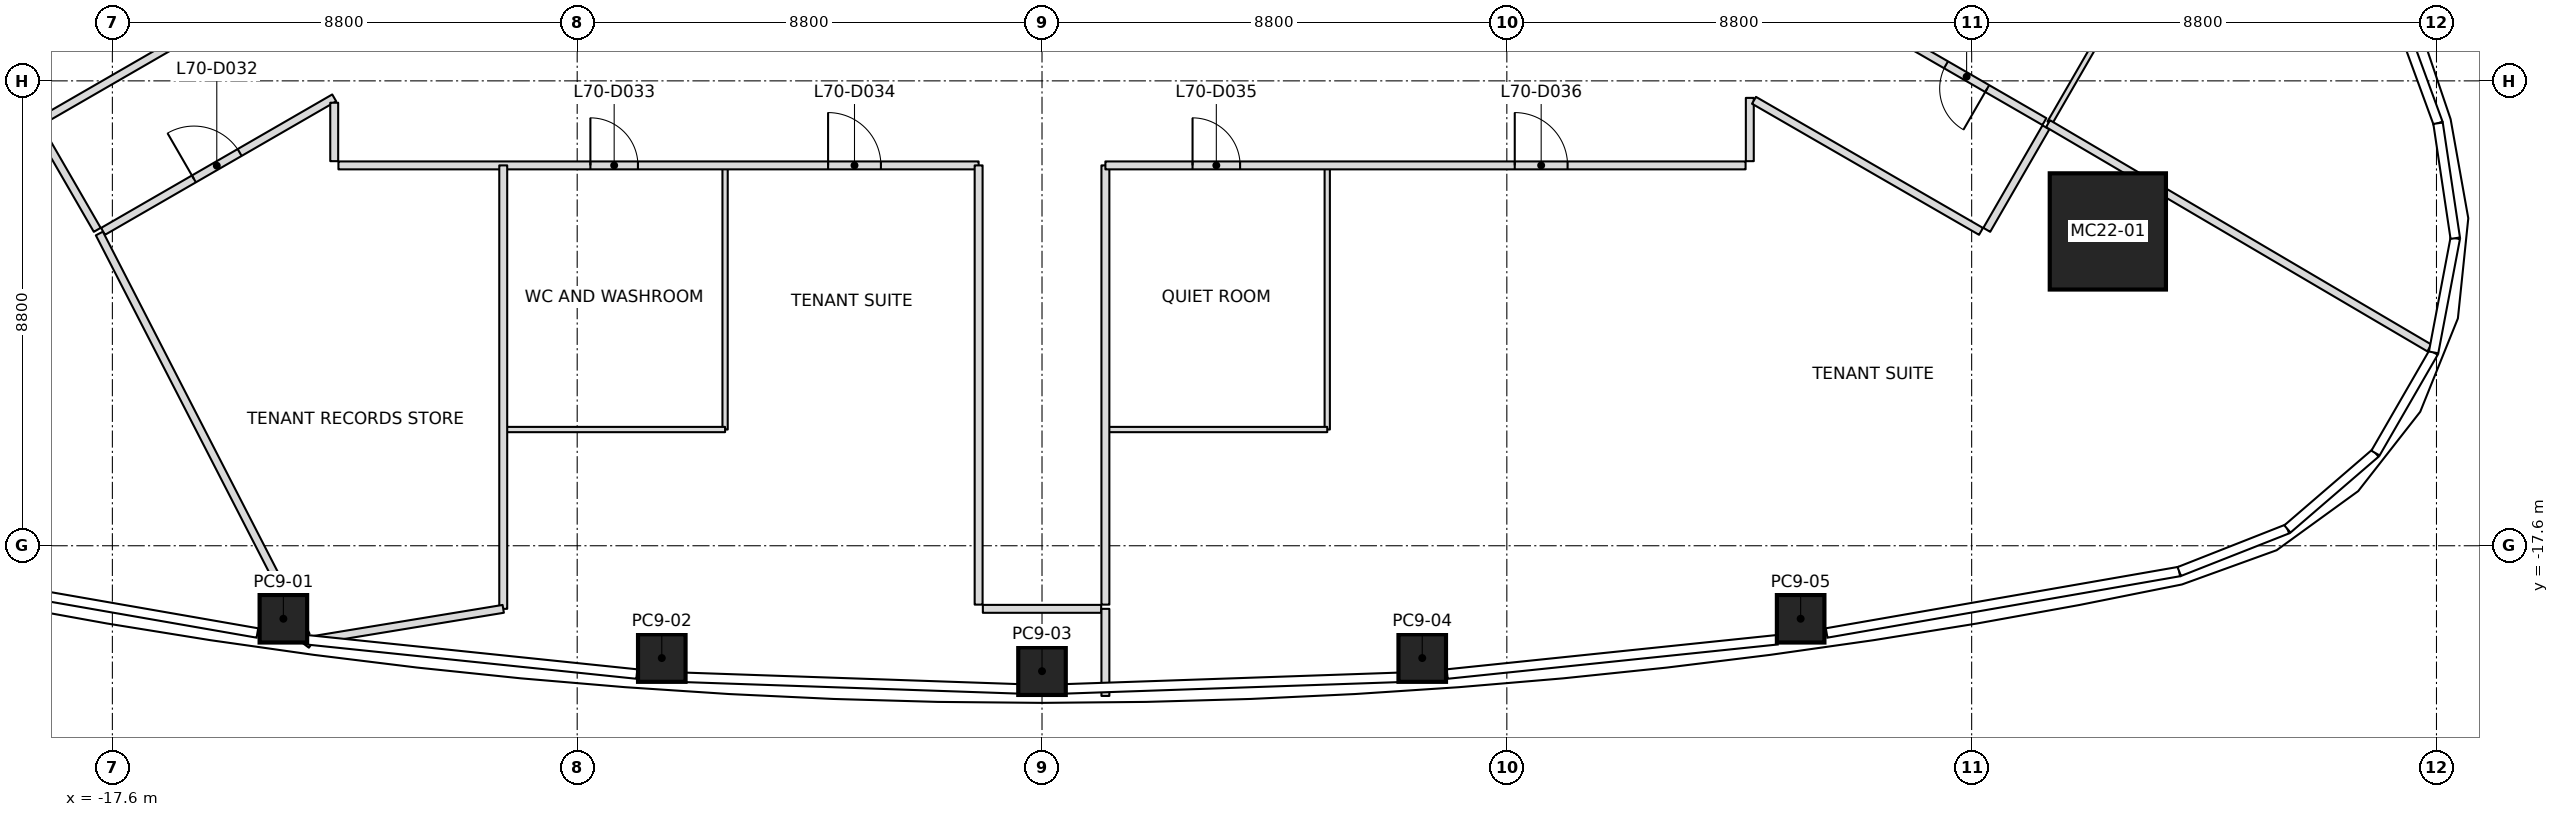
"""IFC4 building model, lengths in metres.
Left out: names, types, materials, properties, quantities, classifications, styles, units other than length and angle.
Written with IfcOpenShell. Run it as: python <this file> out.ifc"""

import sys

from ifc_helpers import new_model, si_unit, direction, frame, frame_2d, origin, origin_2d, place, context, subcontext, project, spatial, rectangle, extrude, element, fill, save


model = new_model("IFC4")
c1 = context("Model", 3, precision=1e-05, world=origin(), true_north=direction((0.0, 1.0)))
c2 = subcontext(c1, "Body", "Model", "MODEL_VIEW")
j1 = project(units=[si_unit("LENGTHUNIT", "METRE"), si_unit("PLANEANGLEUNIT", "RADIAN")], contexts=[c1])
p1 = place(None, origin())
s1 = spatial("IfcSite", under=j1, at=p1, CompositionType="ELEMENT")
p2 = place(p1, origin())
s2 = spatial("IfcBuilding", under=s1, at=p2, CompositionType="ELEMENT")
p3 = place(p2, frame((0.0, 0.0, 307.0)))
s3 = spatial("IfcBuildingStorey", under=s2, at=p3, CompositionType="ELEMENT", Elevation=307.0)
p4 = place(p3, frame((20.178, -11.65, 0.0), z_axis=(-0.027695790401, 0.015983033227, 0.999488612163), x_axis=(0.999616398022, 0.00044283261, 0.027692249912)))
e1 = element("IfcColumn", 1, at=p4, inside=s3, PredefinedType="COLUMN", context=c2, shape_type="SweptSolid", body=[
    extrude(rectangle(XDim=2.2, YDim=2.2, at=origin_2d()), origin(), (0.0, 0.0, 1.0), 4.002),
])
p5 = place(p3, frame((-14.363, -18.982, 0.0), z_axis=(0.017452456582, 0.010373837829, 0.999793876381), x_axis=(-0.990343726518, 0.137723680124, 0.015858476572)))
e2 = element("IfcColumn", 2, at=p5, inside=s3, PredefinedType="COLUMN", context=c2, shape_type="SweptSolid", body=[
    extrude(rectangle(XDim=0.9, YDim=0.9, at=origin_2d()), origin(), (0.0, 0.0, 1.0), 4.001),
])
p6 = place(p3, frame((-7.198, -19.726, 0.0), z_axis=(0.008727150594, 0.011168311599, 0.999899547784), x_axis=(-0.997582824169, 0.069032824425, 0.007935872619)))
e3 = element("IfcColumn", 3, at=p6, inside=s3, PredefinedType="COLUMN", context=c2, shape_type="SweptSolid", body=[
    extrude(rectangle(XDim=0.9, YDim=0.9, at=origin_2d()), origin(), (0.0, 0.0, 1.0), 4.0),
])
p7 = place(p3, frame((0.0, -19.974, 0.0), z_axis=(0.0, 0.01141283087, 0.999934871525), x_axis=(1.0, 0.0, 0.0)))
e4 = element("IfcColumn", 4, at=p7, inside=s3, PredefinedType="COLUMN", context=c2, shape_type="SweptSolid", body=[
    extrude(rectangle(XDim=0.9, YDim=0.9, at=origin_2d()), origin(), (0.0, 0.0, 1.0), 4.0),
])
p8 = place(p3, frame((7.198, -19.726, 0.0), z_axis=(-0.008727150594, 0.011168311599, 0.999899547784), x_axis=(0.997582824169, 0.069032824425, 0.007935872619)))
e5 = element("IfcColumn", 5, at=p8, inside=s3, PredefinedType="COLUMN", context=c2, shape_type="SweptSolid", body=[
    extrude(rectangle(XDim=0.9, YDim=0.9, at=origin_2d()), origin(), (0.0, 0.0, 1.0), 4.0),
])
p9 = place(p3, frame((14.363, -18.982, 0.0), z_axis=(-0.017452456582, 0.010373837829, 0.999793876381), x_axis=(0.990343726518, 0.137723680124, 0.015858476572)))
e6 = element("IfcColumn", 6, at=p9, inside=s3, PredefinedType="COLUMN", context=c2, shape_type="SweptSolid", body=[
    extrude(rectangle(XDim=0.9, YDim=0.9, at=origin_2d()), origin(), (0.0, 0.0, 1.0), 4.001),
])
p10 = place(p3, frame((-17.846, -11.689, 0.0), z_axis=(0.0, 0.0, 1.0), x_axis=(0.457266107694, -0.889329920083, 0.0)))
e7 = element("IfcWall", 7, at=p10, inside=s3, PredefinedType="PARTITIONING", context=c2, shape_type="SweptSolid", body=[
    extrude(rectangle(XDim=8.554, YDim=0.15, at=frame_2d((4.277, 0.0))), origin(), (0.0, 0.0, 1.0), 3.45),
])
p11 = place(p3, frame((-10.2, -10.4, 0.0), z_axis=(0.0, 0.0, 1.0), x_axis=(0.0, -1.0, 0.0)))
e8 = element("IfcWall", 8, at=p11, inside=s3, PredefinedType="PARTITIONING", context=c2, shape_type="SweptSolid", body=[
    extrude(rectangle(XDim=8.394, YDim=0.15, at=frame_2d((4.197, 0.0))), origin(), (0.0, 0.0, 1.0), 3.45),
])
p12 = place(p3, frame((-10.2, -18.794, 0.0), z_axis=(0.0, 0.0, 1.0), x_axis=(-0.986776260691, -0.162088282538, 0.0)))
e9 = element("IfcWall", 9, at=p12, inside=s3, PredefinedType="PARTITIONING", context=c2, shape_type="SweptSolid", body=[
    extrude(rectangle(XDim=3.633, YDim=0.15, at=frame_2d((1.816, 0.0))), origin(), (0.0, 0.0, 1.0), 3.234),
])
p13 = place(p3, frame((-13.835, -19.47, 0.0), z_axis=(0.0, 0.0, 1.0), x_axis=(-0.799522420025, 0.60063624589, 0.0)))
e10 = element("IfcWall", 10, at=p13, inside=s3, PredefinedType="PARTITIONING", context=c2, shape_type="SweptSolid", body=[
    extrude(rectangle(XDim=0.184, YDim=0.15, at=frame_2d((0.092, 0.0))), origin(), (0.0, 0.0, 1.0), 3.45),
])
p14 = place(p3, frame((1.2, -18.794, 0.0), z_axis=(0.0, 0.0, 1.0), x_axis=(0.0, -1.0, 0.0)))
e11 = element("IfcWall", 11, at=p14, inside=s3, PredefinedType="PARTITIONING", context=c2, shape_type="SweptSolid", body=[
    extrude(rectangle(XDim=1.649, YDim=0.15, at=frame_2d((0.824, 0.0))), origin(), (0.0, 0.0, 1.0), 3.234),
])
p15 = place(p3, frame((19.046, -9.611, 0.0), z_axis=(0.0, 0.0, 1.0), x_axis=(0.862012142354, -0.506887627029, 0.0)))
e12 = element("IfcWall", 12, at=p15, inside=s3, PredefinedType="PARTITIONING", context=c2, shape_type="SweptSolid", body=[
    extrude(rectangle(XDim=8.375, YDim=0.15, at=frame_2d((4.188, 0.0))), origin(), (0.0, 0.0, 1.0), 3.234),
])
p16 = place(p3, frame((-19.006, -9.68, 0.0), z_axis=(0.0, 0.0, 1.0), x_axis=(0.49994888933, -0.866054910533, 0.0)))
e13 = element("IfcWall", 13, at=p16, inside=s3, PredefinedType="PARTITIONING", context=c2, shape_type="SweptSolid", body=[
    extrude(rectangle(XDim=2.24, YDim=0.15, at=frame_2d((1.12, 0.0))), origin(), (0.0, 0.0, 1.0), 3.233),
])
p17 = place(p3, frame((-13.4, -6.351, 0.0), z_axis=(0.0, 0.0, 1.0), x_axis=(-0.866015754151, -0.500016713282, 0.0)))
e14 = element("IfcWall", 14, at=p17, inside=s3, PredefinedType="PARTITIONING", context=c2, shape_type="SweptSolid", body=[
    extrude(rectangle(XDim=6.44, YDim=0.15, at=frame_2d((3.22, 0.0))), origin(), (0.0, 0.0, 1.0), 3.317),
])
p18 = place(p3, frame((-17.777, -11.649, 0.0), z_axis=(0.0, 0.0, 1.0), x_axis=(0.866019873856, 0.500009577994, 0.0)))
e15 = element("IfcWall", 15, at=p18, inside=s3, PredefinedType="PARTITIONING", context=c2, shape_type="SweptSolid", body=[
    extrude(rectangle(XDim=5.054, YDim=0.15, at=frame_2d((2.527, 0.0))), origin(), (0.0, 0.0, 1.0), 3.233),
])
p19 = place(p18, frame((1.987, 0.0, 0.0)))
e16 = element("IfcOpeningElement", 16, at=p19, cuts=e15, PredefinedType="OPENING", context=c2, shape_type="SweptSolid", body=[
    extrude(rectangle(XDim=1.0, YDim=2.1, at=frame_2d((0.5, 1.05))), frame((0.0, 0.075, 0.0), z_axis=(0.0, -1.0, 0.0), x_axis=(1.0, 0.0, 0.0)), (0.0, 0.0, 1.0), 0.15),
])
p20 = place(p3, frame((-13.4, -9.214, 0.0), z_axis=(0.0, 0.0, 1.0), x_axis=(0.0, -1.0, 0.0)))
e17 = element("IfcWall", 17, at=p20, inside=s3, PredefinedType="PARTITIONING", context=c2, shape_type="SweptSolid", body=[
    extrude(rectangle(XDim=1.106, YDim=0.15, at=frame_2d((0.553, 0.0))), origin(), (0.0, 0.0, 1.0), 3.233),
])
p21 = place(p3, frame((-13.32, -10.4, 0.0), z_axis=(0.0, 0.0, 1.0), x_axis=(1.0, 0.0, 0.0)))
e18 = element("IfcWall", 18, at=p21, inside=s3, PredefinedType="PARTITIONING", context=c2, shape_type="SweptSolid", body=[
    extrude(rectangle(XDim=12.12, YDim=0.15, at=frame_2d((6.06, 0.0))), origin(), (0.0, 0.0, 1.0), 3.393),
])
p22 = place(p21, frame((4.77, 0.0, 0.0)))
e19 = element("IfcOpeningElement", 19, at=p22, cuts=e18, PredefinedType="OPENING", context=c2, shape_type="SweptSolid", body=[
    extrude(rectangle(XDim=0.9, YDim=2.1, at=frame_2d((0.45, 1.05))), frame((0.0, 0.075, 0.0), z_axis=(0.0, -1.0, 0.0), x_axis=(1.0, 0.0, 0.0)), (0.0, 0.0, 1.0), 0.15),
])
p23 = place(p21, frame((9.27, 0.0, 0.0)))
e20 = element("IfcOpeningElement", 20, at=p23, cuts=e18, PredefinedType="OPENING", context=c2, shape_type="SweptSolid", body=[
    extrude(rectangle(XDim=1.0, YDim=2.1, at=frame_2d((0.5, 1.05))), frame((0.0, 0.075, 0.0), z_axis=(0.0, -1.0, 0.0), x_axis=(1.0, 0.0, 0.0)), (0.0, 0.0, 1.0), 0.15),
])
p24 = place(p3, frame((-1.2, -10.4, 0.0), z_axis=(0.0, 0.0, 1.0), x_axis=(0.0, -1.0, 0.0)))
e21 = element("IfcWall", 21, at=p24, inside=s3, PredefinedType="PARTITIONING", context=c2, shape_type="SweptSolid", body=[
    extrude(rectangle(XDim=8.314, YDim=0.15, at=frame_2d((4.157, 0.0))), origin(), (0.0, 0.0, 1.0), 3.45),
])
p25 = place(p3, frame((-1.12, -18.794, 0.0), z_axis=(0.0, 0.0, 1.0), x_axis=(1.0, 0.0, 0.0)))
e22 = element("IfcWall", 22, at=p25, inside=s3, PredefinedType="PARTITIONING", context=c2, shape_type="SweptSolid", body=[
    extrude(rectangle(XDim=2.24, YDim=0.15, at=frame_2d((1.12, 0.0))), origin(), (0.0, 0.0, 1.0), 3.45),
])
p26 = place(p3, frame((1.2, -18.714, 0.0), z_axis=(0.0, 0.0, 1.0), x_axis=(0.0, 1.0, 0.0)))
e23 = element("IfcWall", 23, at=p26, inside=s3, PredefinedType="PARTITIONING", context=c2, shape_type="SweptSolid", body=[
    extrude(rectangle(XDim=8.314, YDim=0.15, at=frame_2d((4.157, 0.0))), origin(), (0.0, 0.0, 1.0), 3.45),
])
p27 = place(p3, frame((1.2, -10.4, 0.0), z_axis=(0.0, 0.0, 1.0), x_axis=(1.0, 0.0, 0.0)))
e24 = element("IfcWall", 24, at=p27, inside=s3, PredefinedType="PARTITIONING", context=c2, shape_type="SweptSolid", body=[
    extrude(rectangle(XDim=12.12, YDim=0.15, at=frame_2d((6.06, 0.0))), origin(), (0.0, 0.0, 1.0), 3.393),
])
p28 = place(p27, frame((1.65, 0.0, 0.0)))
e25 = element("IfcOpeningElement", 25, at=p28, cuts=e24, PredefinedType="OPENING", context=c2, shape_type="SweptSolid", body=[
    extrude(rectangle(XDim=0.9, YDim=2.1, at=frame_2d((0.45, 1.05))), frame((0.0, 0.075, 0.0), z_axis=(0.0, -1.0, 0.0), x_axis=(1.0, 0.0, 0.0)), (0.0, 0.0, 1.0), 0.15),
])
p29 = place(p27, frame((7.75, 0.0, 0.0)))
e26 = element("IfcOpeningElement", 26, at=p29, cuts=e24, PredefinedType="OPENING", context=c2, shape_type="SweptSolid", body=[
    extrude(rectangle(XDim=1.0, YDim=2.1, at=frame_2d((0.5, 1.05))), frame((0.0, 0.075, 0.0), z_axis=(0.0, -1.0, 0.0), x_axis=(1.0, 0.0, 0.0)), (0.0, 0.0, 1.0), 0.15),
])
p30 = place(p3, frame((13.4, -10.32, 0.0), z_axis=(0.0, 0.0, 1.0), x_axis=(0.0, 1.0, 0.0)))
e27 = element("IfcWall", 27, at=p30, inside=s3, PredefinedType="PARTITIONING", context=c2, shape_type="SweptSolid", body=[
    extrude(rectangle(XDim=1.198, YDim=0.15, at=frame_2d((0.599, 0.0))), origin(), (0.0, 0.0, 1.0), 3.233),
])
p31 = place(p3, frame((13.479, -9.168, 0.0), z_axis=(0.0, 0.0, 1.0), x_axis=(0.866027465686, -0.499996428664, 0.0)))
e28 = element("IfcWall", 28, at=p31, inside=s3, PredefinedType="PARTITIONING", context=c2, shape_type="SweptSolid", body=[
    extrude(rectangle(XDim=4.962, YDim=0.15, at=frame_2d((2.481, 0.0))), origin(), (0.0, 0.0, 1.0), 3.233),
])
p32 = place(p3, frame((18.977, -9.571, 0.0), z_axis=(0.0, 0.0, 1.0), x_axis=(-0.866015754151, 0.500016713282, 0.0)))
e29 = element("IfcWall", 29, at=p32, inside=s3, PredefinedType="PARTITIONING", context=c2, shape_type="SweptSolid", body=[
    extrude(rectangle(XDim=6.44, YDim=0.15, at=frame_2d((3.22, 0.0))), origin(), (0.0, 0.0, 1.0), 3.317),
])
p33 = place(p32, frame((1.25, 0.0, 0.0)))
e30 = element("IfcOpeningElement", 30, at=p33, cuts=e29, PredefinedType="OPENING", context=c2, shape_type="SweptSolid", body=[
    extrude(rectangle(XDim=0.9, YDim=2.1, at=frame_2d((0.45, 1.05))), frame((0.0, 0.075, 0.0), z_axis=(0.0, -1.0, 0.0), x_axis=(1.0, 0.0, 0.0)), (0.0, 0.0, 1.0), 0.15),
])
p34 = place(p32, frame((4.52, 0.0, 0.0)))
e31 = element("IfcOpeningElement", 31, at=p34, cuts=e29, PredefinedType="OPENING", context=c2, shape_type="SweptSolid", body=[
    extrude(rectangle(XDim=1.0, YDim=2.1, at=frame_2d((0.5, 1.05))), frame((0.0, 0.075, 0.0), z_axis=(0.0, -1.0, 0.0), x_axis=(1.0, 0.0, 0.0)), (0.0, 0.0, 1.0), 0.15),
])
p35 = place(p3, frame((17.886, -11.62, 0.0), z_axis=(0.0, 0.0, 1.0), x_axis=(0.49994888933, 0.866054910533, 0.0)))
e32 = element("IfcWall", 32, at=p35, inside=s3, PredefinedType="PARTITIONING", context=c2, shape_type="SweptSolid", body=[
    extrude(rectangle(XDim=2.24, YDim=0.15, at=frame_2d((1.12, 0.0))), origin(), (0.0, 0.0, 1.0), 3.233),
])
p36 = place(p3, frame((-6.0, -10.43, 0.0), z_axis=(0.0, 0.0, 1.0), x_axis=(0.0, -1.0, 0.0)))
e33 = element("IfcWall", 33, at=p36, inside=s3, PredefinedType="PARTITIONING", context=c2, shape_type="SweptSolid", body=[
    extrude(rectangle(XDim=4.97, YDim=0.1, at=frame_2d((2.485, 0.0))), origin(), (0.0, 0.0, 1.0), 3.45),
])
p37 = place(p3, frame((-6.0, -15.4, 0.0), z_axis=(0.0, 0.0, 1.0), x_axis=(-1.0, 0.0, 0.0)))
e34 = element("IfcWall", 34, at=p37, inside=s3, PredefinedType="PARTITIONING", context=c2, shape_type="SweptSolid", body=[
    extrude(rectangle(XDim=4.17, YDim=0.1, at=frame_2d((2.085, 0.0))), origin(), (0.0, 0.0, 1.0), 3.393),
])
p38 = place(p3, frame((5.4, -10.43, 0.0), z_axis=(0.0, 0.0, 1.0), x_axis=(0.0, -1.0, 0.0)))
e35 = element("IfcWall", 35, at=p38, inside=s3, PredefinedType="PARTITIONING", context=c2, shape_type="SweptSolid", body=[
    extrude(rectangle(XDim=4.97, YDim=0.1, at=frame_2d((2.485, 0.0))), origin(), (0.0, 0.0, 1.0), 3.45),
])
p39 = place(p3, frame((5.4, -15.4, 0.0), z_axis=(0.0, 0.0, 1.0), x_axis=(-1.0, 0.0, 0.0)))
e36 = element("IfcWall", 36, at=p39, inside=s3, PredefinedType="PARTITIONING", context=c2, shape_type="SweptSolid", body=[
    extrude(rectangle(XDim=4.17, YDim=0.1, at=frame_2d((2.085, 0.0))), origin(), (0.0, 0.0, 1.0), 3.393),
])
p40 = place(p3, frame((21.164, -5.983, 0.0), z_axis=(0.0, 0.0, 1.0), x_axis=(-0.499992746786, -0.866029591389, 0.0)))
e37 = element("IfcWall", 37, at=p40, inside=s3, PredefinedType="PARTITIONING", context=c2, shape_type="SweptSolid", body=[
    extrude(rectangle(XDim=4.17, YDim=0.1, at=frame_2d((2.085, 0.0))), origin(), (0.0, 0.0, 1.0), 3.45),
])
p41 = place(p19, origin())
e38 = element("IfcDoor", 38, at=p41, inside=s3, OperationType="SINGLE_SWING_LEFT", PredefinedType="DOOR", context=c2, shape_type="SweptSolid", body=[
    extrude(rectangle(XDim=1.0, YDim=2.1, at=frame_2d((0.5, 1.05))), frame((0.0, 0.025, 0.0), z_axis=(0.0, -1.0, 0.0), x_axis=(1.0, 0.0, 0.0)), (0.0, 0.0, 1.0), 0.05),
])
fill(e16, e38)
p42 = place(p22, origin())
e39 = element("IfcDoor", 39, at=p42, inside=s3, OperationType="SINGLE_SWING_LEFT", PredefinedType="DOOR", context=c2, shape_type="SweptSolid", body=[
    extrude(rectangle(XDim=0.9, YDim=2.1, at=frame_2d((0.45, 1.05))), frame((0.0, 0.025, 0.0), z_axis=(0.0, -1.0, 0.0), x_axis=(1.0, 0.0, 0.0)), (0.0, 0.0, 1.0), 0.05),
])
fill(e19, e39)
p43 = place(p23, origin())
e40 = element("IfcDoor", 40, at=p43, inside=s3, OperationType="SINGLE_SWING_LEFT", PredefinedType="DOOR", context=c2, shape_type="SweptSolid", body=[
    extrude(rectangle(XDim=1.0, YDim=2.1, at=frame_2d((0.5, 1.05))), frame((0.0, 0.025, 0.0), z_axis=(0.0, -1.0, 0.0), x_axis=(1.0, 0.0, 0.0)), (0.0, 0.0, 1.0), 0.05),
])
fill(e20, e40)
p44 = place(p28, origin())
e41 = element("IfcDoor", 41, at=p44, inside=s3, OperationType="SINGLE_SWING_LEFT", PredefinedType="DOOR", context=c2, shape_type="SweptSolid", body=[
    extrude(rectangle(XDim=0.9, YDim=2.1, at=frame_2d((0.45, 1.05))), frame((0.0, 0.025, 0.0), z_axis=(0.0, -1.0, 0.0), x_axis=(1.0, 0.0, 0.0)), (0.0, 0.0, 1.0), 0.05),
])
fill(e25, e41)
p45 = place(p29, origin())
e42 = element("IfcDoor", 42, at=p45, inside=s3, OperationType="SINGLE_SWING_LEFT", PredefinedType="DOOR", context=c2, shape_type="SweptSolid", body=[
    extrude(rectangle(XDim=1.0, YDim=2.1, at=frame_2d((0.5, 1.05))), frame((0.0, 0.025, 0.0), z_axis=(0.0, -1.0, 0.0), x_axis=(1.0, 0.0, 0.0)), (0.0, 0.0, 1.0), 0.05),
])
fill(e26, e42)
p46 = place(p33, origin())
e43 = element("IfcDoor", 43, at=p46, inside=s3, OperationType="SINGLE_SWING_LEFT", PredefinedType="DOOR", context=c2, shape_type="SweptSolid", body=[
    extrude(rectangle(XDim=0.9, YDim=2.1, at=frame_2d((0.45, 1.05))), frame((0.0, 0.025, 0.0), z_axis=(0.0, -1.0, 0.0), x_axis=(1.0, 0.0, 0.0)), (0.0, 0.0, 1.0), 0.05),
])
fill(e30, e43)
save(model, sys.argv[1])
